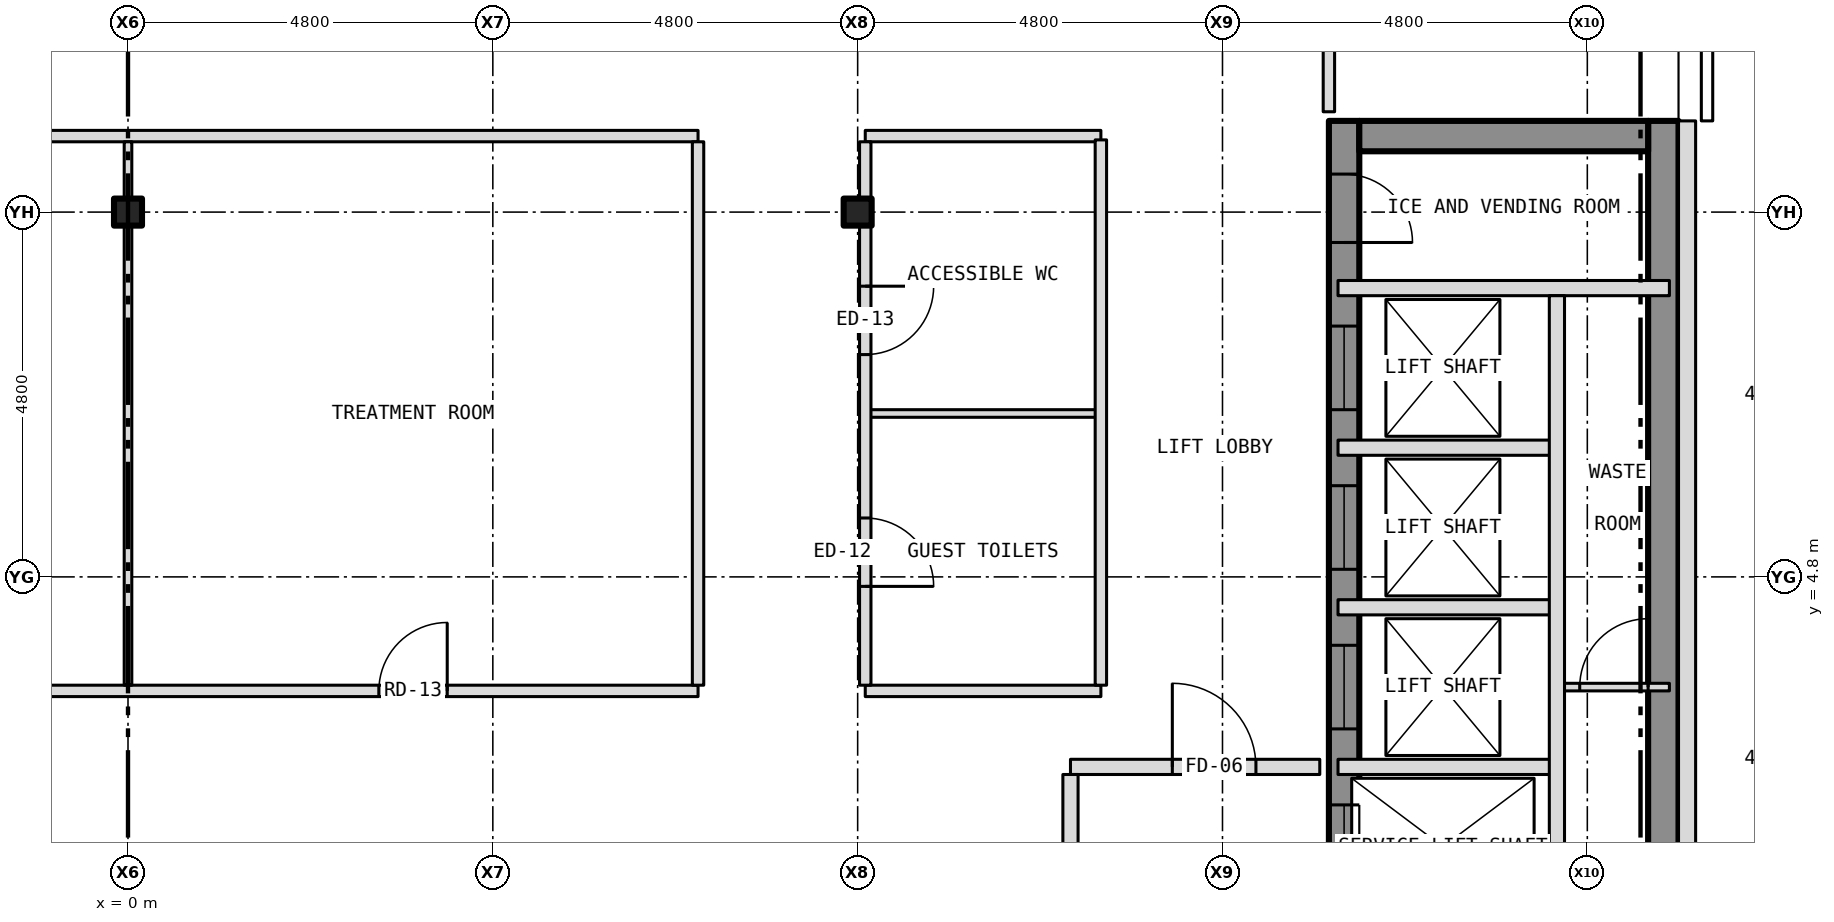
"""IFC4 building model, lengths in metres.
Left out: names, types, materials, properties, quantities, classifications, styles, units other than length and angle.
Written with IfcOpenShell. Run it as: python <this file> out.ifc"""

import sys

from ifc_helpers import new_model, si_unit, direction, frame, frame_2d, origin, origin_2d, place, context, subcontext, project, spatial, rectangle, i_section, extrude, element, fill, save


model = new_model("IFC4")
c1 = context("Model", 3, precision=1e-05, world=origin(), true_north=direction((0.0, 1.0)))
c2 = subcontext(c1, "Body", "Model", "MODEL_VIEW")
j1 = project(units=[si_unit("LENGTHUNIT", "METRE"), si_unit("PLANEANGLEUNIT", "RADIAN")], contexts=[c1])
p1 = place(None, origin())
s1 = spatial("IfcSite", under=j1, at=p1, CompositionType="ELEMENT")
p2 = place(p1, origin())
s2 = spatial("IfcBuilding", under=s1, at=p2, CompositionType="ELEMENT")
p3 = place(p2, frame((0.0, 0.0, 244.5)))
s3 = spatial("IfcBuildingStorey", under=s2, at=p3, CompositionType="ELEMENT", Elevation=244.5)
for number, where, z_axis, x_axis in (
    (1, (0.0, 9.6, -0.15), (0.0, 0.0, 1.0), (1.0, 0.0, 0.0)),
    (2, (9.6, 9.6, -0.15), (0.0, 0.0, 1.0), (1.0, 0.0, 0.0)),
):
    element("IfcColumn", number, at=place(p3, frame(where, z_axis=z_axis, x_axis=x_axis)), inside=s3, PredefinedType="COLUMN", context=c2, shape_type="SweptSolid", body=[
        extrude(i_section(OverallWidth=0.368, OverallDepth=0.356, WebThickness=0.011, FlangeThickness=0.018, at=origin_2d()), origin(), (0.0, 0.0, 1.0), 3.5),
    ])
p4 = place(p3, frame((16.0, -10.8, 0.0), z_axis=(0.0, 0.0, 1.0), x_axis=(0.0, 1.0, 0.0)))
e3 = element("IfcWall", 3, at=p4, inside=s3, PredefinedType="SHEAR", context=c2, shape_type="SweptSolid", body=[
    extrude(rectangle(XDim=21.6, YDim=0.4, at=frame_2d((10.8, 0.0))), origin(), (0.0, 0.0, 1.0), 3.25),
])
p5 = place(p4, frame((9.4, 0.0, 0.0)))
e4 = element("IfcOpeningElement", 4, at=p5, cuts=e3, PredefinedType="OPENING", context=c2, shape_type="SweptSolid", body=[
    extrude(rectangle(XDim=1.1, YDim=2.1, at=frame_2d((0.55, 1.05))), frame((0.0, 0.212, 0.0), z_axis=(0.0, -1.0, 0.0), x_axis=(1.0, 0.0, 0.0)), (0.0, 0.0, 1.0), 0.424),
])
p6 = place(p4, frame((11.5, 0.0, 0.0)))
e5 = element("IfcOpeningElement", 5, at=p6, cuts=e3, PredefinedType="OPENING", context=c2, shape_type="SweptSolid", body=[
    extrude(rectangle(XDim=1.1, YDim=2.1, at=frame_2d((0.55, 1.05))), frame((0.0, 0.212, 0.0), z_axis=(0.0, -1.0, 0.0), x_axis=(1.0, 0.0, 0.0)), (0.0, 0.0, 1.0), 0.424),
])
p7 = place(p4, frame((13.6, 0.0, 0.0)))
e6 = element("IfcOpeningElement", 6, at=p7, cuts=e3, PredefinedType="OPENING", context=c2, shape_type="SweptSolid", body=[
    extrude(rectangle(XDim=1.1, YDim=2.1, at=frame_2d((0.55, 1.05))), frame((0.0, 0.212, 0.0), z_axis=(0.0, -1.0, 0.0), x_axis=(1.0, 0.0, 0.0)), (0.0, 0.0, 1.0), 0.424),
])
p8 = place(p4, frame((15.7, 0.0, 0.0)))
e7 = element("IfcOpeningElement", 7, at=p8, cuts=e3, PredefinedType="OPENING", context=c2, shape_type="SweptSolid", body=[
    extrude(rectangle(XDim=1.1, YDim=2.1, at=frame_2d((0.55, 1.05))), frame((0.0, 0.212, 0.0), z_axis=(0.0, -1.0, 0.0), x_axis=(1.0, 0.0, 0.0)), (0.0, 0.0, 1.0), 0.424),
])
p9 = place(p4, frame((17.8, 0.0, 0.0)))
e8 = element("IfcOpeningElement", 8, at=p9, cuts=e3, PredefinedType="OPENING", context=c2, shape_type="SweptSolid", body=[
    extrude(rectangle(XDim=1.1, YDim=2.1, at=frame_2d((0.55, 1.05))), frame((0.0, 0.212, 0.0), z_axis=(0.0, -1.0, 0.0), x_axis=(1.0, 0.0, 0.0)), (0.0, 0.0, 1.0), 0.424),
])
p10 = place(p4, frame((5.642, 0.0, 0.0)))
e9 = element("IfcOpeningElement", 9, at=p10, cuts=e3, PredefinedType="OPENING", context=c2, shape_type="SweptSolid", body=[
    extrude(rectangle(XDim=1.1, YDim=2.1, at=frame_2d((0.55, 1.05))), frame((0.0, 0.212, 0.0), z_axis=(0.0, -1.0, 0.0), x_axis=(1.0, 0.0, 0.0)), (0.0, 0.0, 1.0), 0.424),
])
p11 = place(p4, frame((7.5, 0.0, 0.0)))
e10 = element("IfcOpeningElement", 10, at=p11, cuts=e3, PredefinedType="OPENING", context=c2, shape_type="SweptSolid", body=[
    extrude(rectangle(XDim=1.1, YDim=2.1, at=frame_2d((0.55, 1.05))), frame((0.0, 0.212, 0.0), z_axis=(0.0, -1.0, 0.0), x_axis=(1.0, 0.0, 0.0)), (0.0, 0.0, 1.0), 0.424),
])
p12 = place(p4, frame((20.0, 0.0, 0.0)))
e11 = element("IfcOpeningElement", 11, at=p12, cuts=e3, PredefinedType="OPENING", context=c2, shape_type="SweptSolid", body=[
    extrude(rectangle(XDim=0.9, YDim=2.1, at=frame_2d((0.45, 1.05))), frame((0.0, 0.212, 0.0), z_axis=(0.0, -1.0, 0.0), x_axis=(1.0, 0.0, 0.0)), (0.0, 0.0, 1.0), 0.424),
])
p13 = place(p3, frame((20.2, -10.8, 0.0), z_axis=(0.0, 0.0, 1.0), x_axis=(0.0, 1.0, 0.0)))
e12 = element("IfcWall", 12, at=p13, inside=s3, PredefinedType="SHEAR", context=c2, shape_type="SweptSolid", body=[
    extrude(rectangle(XDim=21.6, YDim=0.4, at=frame_2d((10.8, 0.0))), origin(), (0.0, 0.0, 1.0), 3.25),
])
p14 = place(p3, frame((16.2, 10.6, 0.0), z_axis=(0.0, 0.0, 1.0), x_axis=(1.0, 0.0, 0.0)))
e13 = element("IfcWall", 13, at=p14, inside=s3, PredefinedType="SHEAR", context=c2, shape_type="SweptSolid", body=[
    extrude(rectangle(XDim=3.8, YDim=0.4, at=frame_2d((1.9, 0.0))), origin(), (0.0, 0.0, 1.0), 3.25),
])
p15 = place(p3, frame((20.512, -10.8, 0.0), z_axis=(0.0, 0.0, 1.0), x_axis=(0.0, 1.0, 0.0)))
e14 = element("IfcWall", 14, at=p15, inside=s3, PredefinedType="SOLIDWALL", context=c2, shape_type="SweptSolid", body=[
    extrude(rectangle(XDim=21.6, YDim=0.225, at=frame_2d((10.8, 0.0))), origin(), (0.0, 0.0, 1.0), 3.5),
])
p16 = place(p15, frame((2.95, 0.0, 1.0)))
e15 = element("IfcOpeningElement", 15, at=p16, cuts=e14, PredefinedType="OPENING", context=c2, shape_type="SweptSolid", body=[
    extrude(rectangle(XDim=0.6, YDim=1.5, at=frame_2d((0.3, 0.75))), frame((0.0, 0.125, 0.0), z_axis=(0.0, -1.0, 0.0), x_axis=(1.0, 0.0, 0.0)), (0.0, 0.0, 1.0), 0.249),
])
p17 = place(p3, frame((12.4, 2.3, 0.0), z_axis=(0.0, 0.0, 1.0), x_axis=(1.0, 0.0, 0.0)))
e16 = element("IfcWall", 16, at=p17, inside=s3, PredefinedType="PARTITIONING", context=c2, shape_type="SweptSolid", body=[
    extrude(rectangle(XDim=3.28, YDim=0.2, at=frame_2d((1.64, 0.0))), origin(), (0.0, 0.0, 1.0), 3.35),
])
p18 = place(p17, frame((1.34, 0.0, 0.0)))
e17 = element("IfcOpeningElement", 17, at=p18, cuts=e16, PredefinedType="OPENING", context=c2, shape_type="SweptSolid", body=[
    extrude(rectangle(XDim=1.1, YDim=2.1, at=frame_2d((0.55, 1.05))), frame((0.0, 0.112, 0.0), z_axis=(0.0, -1.0, 0.0), x_axis=(1.0, 0.0, 0.0)), (0.0, 0.0, 1.0), 0.224),
])
p19 = place(p3, frame((15.92, 2.3, 0.0), z_axis=(0.0, 0.0, 1.0), x_axis=(1.0, 0.0, 0.0)))
e18 = element("IfcWall", 18, at=p19, inside=s3, PredefinedType="PARTITIONING", context=c2, shape_type="SweptSolid", body=[
    extrude(rectangle(XDim=2.88, YDim=0.2, at=frame_2d((1.44, 0.0))), origin(), (0.0, 0.0, 1.0), 3.25),
])
p20 = place(p3, frame((-12.8, 3.3, 0.0), z_axis=(0.0, 0.0, 1.0), x_axis=(1.0, 0.0, 0.0)))
e19 = element("IfcWall", 19, at=p20, inside=s3, PredefinedType="PARTITIONING", context=c2, shape_type="SweptSolid", body=[
    extrude(rectangle(XDim=20.3, YDim=0.15, at=frame_2d((10.15, 0.0))), origin(), (0.0, 0.0, 1.0), 3.35),
])
p21 = place(p20, frame((16.1, 0.0, 0.0)))
e20 = element("IfcOpeningElement", 20, at=p21, cuts=e19, PredefinedType="OPENING", context=c2, shape_type="SweptSolid", body=[
    extrude(rectangle(XDim=0.9, YDim=2.1, at=frame_2d((0.45, 1.05))), frame((0.0, 0.087, 0.0), z_axis=(0.0, -1.0, 0.0), x_axis=(1.0, 0.0, 0.0)), (0.0, 0.0, 1.0), 0.174),
])
p22 = place(p3, frame((9.7, 3.3, 0.0), z_axis=(0.0, 0.0, 1.0), x_axis=(1.0, 0.0, 0.0)))
e21 = element("IfcWall", 21, at=p22, inside=s3, PredefinedType="PARTITIONING", context=c2, shape_type="SweptSolid", body=[
    extrude(rectangle(XDim=3.1, YDim=0.15, at=frame_2d((1.55, 0.0))), origin(), (0.0, 0.0, 1.0), 3.35),
])
p23 = place(p3, frame((18.8, 3.35, 0.0), z_axis=(0.0, 0.0, 1.0), x_axis=(1.0, 0.0, 0.0)))
e22 = element("IfcWall", 22, at=p23, inside=s3, PredefinedType="PARTITIONING", context=c2, shape_type="SweptSolid", body=[
    extrude(rectangle(XDim=1.48, YDim=0.1, at=frame_2d((0.74, 0.0))), origin(), (0.0, 0.0, 1.0), 3.25),
])
p24 = place(p23, frame((0.3, 0.0, 0.0)))
e23 = element("IfcOpeningElement", 23, at=p24, cuts=e22, PredefinedType="OPENING", context=c2, shape_type="SweptSolid", body=[
    extrude(rectangle(XDim=0.9, YDim=2.1, at=frame_2d((0.45, 1.05))), frame((0.0, 0.062, 0.0), z_axis=(0.0, -1.0, 0.0), x_axis=(1.0, 0.0, 0.0)), (0.0, 0.0, 1.0), 0.124),
])
for number, where, z_axis, x_axis in (
    (24, (15.92, 4.4, 0.0), (0.0, 0.0, 1.0), (1.0, 0.0, 0.0)),
    (25, (15.92, 6.5, 0.0), (0.0, 0.0, 1.0), (1.0, 0.0, 0.0)),
):
    element("IfcWall", number, at=place(p3, frame(where, z_axis=z_axis, x_axis=x_axis)), inside=s3, PredefinedType="PARTITIONING", context=c2, shape_type="SweptSolid", body=[
        extrude(rectangle(XDim=2.88, YDim=0.2, at=frame_2d((1.44, 0.0))), origin(), (0.0, 0.0, 1.0), 3.25),
    ])
p25 = place(p3, frame((9.7, 6.95, 0.0), z_axis=(0.0, 0.0, 1.0), x_axis=(1.0, 0.0, 0.0)))
e26 = element("IfcWall", 26, at=p25, inside=s3, PredefinedType="PARTITIONING", context=c2, shape_type="SweptSolid", body=[
    extrude(rectangle(XDim=3.1, YDim=0.1, at=frame_2d((1.55, 0.0))), origin(), (0.0, 0.0, 1.0), 3.35),
])
p26 = place(p3, frame((15.92, 8.6, 0.0), z_axis=(0.0, 0.0, 1.0), x_axis=(1.0, 0.0, 0.0)))
e27 = element("IfcWall", 27, at=p26, inside=s3, PredefinedType="PARTITIONING", context=c2, shape_type="SweptSolid", body=[
    extrude(rectangle(XDim=4.36, YDim=0.2, at=frame_2d((2.18, 0.0))), origin(), (0.0, 0.0, 1.0), 3.25),
])
p27 = place(p3, frame((-12.8, 10.6, 0.0), z_axis=(0.0, 0.0, 1.0), x_axis=(1.0, 0.0, 0.0)))
e28 = element("IfcWall", 28, at=p27, inside=s3, PredefinedType="PARTITIONING", context=c2, shape_type="SweptSolid", body=[
    extrude(rectangle(XDim=20.3, YDim=0.15, at=frame_2d((10.15, 0.0))), origin(), (0.0, 0.0, 1.0), 3.35),
])
p28 = place(p27, frame((5.95, 0.0, 0.0)))
e29 = element("IfcOpeningElement", 29, at=p28, cuts=e28, PredefinedType="OPENING", context=c2, shape_type="SweptSolid", body=[
    extrude(rectangle(XDim=0.9, YDim=2.1, at=frame_2d((0.45, 1.05))), frame((0.0, 0.087, 0.0), z_axis=(0.0, -1.0, 0.0), x_axis=(1.0, 0.0, 0.0)), (0.0, 0.0, 1.0), 0.174),
])
p29 = place(p3, frame((9.7, 10.6, 0.0), z_axis=(0.0, 0.0, 1.0), x_axis=(1.0, 0.0, 0.0)))
e30 = element("IfcWall", 30, at=p29, inside=s3, PredefinedType="PARTITIONING", context=c2, shape_type="SweptSolid", body=[
    extrude(rectangle(XDim=3.1, YDim=0.15, at=frame_2d((1.55, 0.0))), origin(), (0.0, 0.0, 1.0), 3.35),
])
p30 = place(p3, frame((0.0, 3.375, 0.0), z_axis=(0.0, 0.0, 1.0), x_axis=(0.0, 1.0, 0.0)))
e31 = element("IfcWall", 31, at=p30, inside=s3, PredefinedType="PARTITIONING", context=c2, shape_type="SweptSolid", body=[
    extrude(rectangle(XDim=6.041, YDim=0.1, at=frame_2d((3.021, 0.0))), origin(), (0.0, 0.0, 1.0), 2.728),
])
p31 = place(p3, frame((0.0, 9.416, 0.0), z_axis=(0.0, 0.0, 1.0), x_axis=(0.0, 1.0, 0.0)))
e32 = element("IfcWall", 32, at=p31, inside=s3, PredefinedType="PARTITIONING", context=c2, shape_type="SweptSolid", body=[
    extrude(rectangle(XDim=0.368, YDim=0.1, at=frame_2d((0.184, 0.0))), origin(), (0.0, 0.0, 1.0), 3.35),
])
p32 = place(p3, frame((0.0, 9.784, 0.0), z_axis=(0.0, 0.0, 1.0), x_axis=(0.0, 1.0, 0.0)))
e33 = element("IfcWall", 33, at=p32, inside=s3, PredefinedType="PARTITIONING", context=c2, shape_type="SweptSolid", body=[
    extrude(rectangle(XDim=0.741, YDim=0.1, at=frame_2d((0.371, 0.0))), origin(), (0.0, 0.0, 1.0), 2.728),
])
p33 = place(p3, frame((7.5, 3.375, 0.0), z_axis=(0.0, 0.0, 1.0), x_axis=(0.0, 1.0, 0.0)))
e34 = element("IfcWall", 34, at=p33, inside=s3, PredefinedType="PARTITIONING", context=c2, shape_type="SweptSolid", body=[
    extrude(rectangle(XDim=7.15, YDim=0.15, at=frame_2d((3.575, 0.0))), origin(), (0.0, 0.0, 1.0), 3.35),
])
p34 = place(p3, frame((9.7, 3.375, 0.0), z_axis=(0.0, 0.0, 1.0), x_axis=(0.0, 1.0, 0.0)))
e35 = element("IfcWall", 35, at=p34, inside=s3, PredefinedType="PARTITIONING", context=c2, shape_type="SweptSolid", body=[
    extrude(rectangle(XDim=6.041, YDim=0.15, at=frame_2d((3.021, 0.0))), origin(), (0.0, 0.0, 1.0), 2.728),
])
p35 = place(p34, frame((1.3, 0.0, 0.0)))
e36 = element("IfcOpeningElement", 36, at=p35, cuts=e35, PredefinedType="OPENING", context=c2, shape_type="SweptSolid", body=[
    extrude(rectangle(XDim=0.9, YDim=2.1, at=frame_2d((0.45, 1.05))), frame((0.0, 0.087, 0.0), z_axis=(0.0, -1.0, 0.0), x_axis=(1.0, 0.0, 0.0)), (0.0, 0.0, 1.0), 0.174),
])
p36 = place(p34, frame((4.35, 0.0, 0.0)))
e37 = element("IfcOpeningElement", 37, at=p36, cuts=e35, PredefinedType="OPENING", context=c2, shape_type="SweptSolid", body=[
    extrude(rectangle(XDim=0.9, YDim=2.1, at=frame_2d((0.45, 1.05))), frame((0.0, 0.087, 0.0), z_axis=(0.0, -1.0, 0.0), x_axis=(1.0, 0.0, 0.0)), (0.0, 0.0, 1.0), 0.174),
])
p37 = place(p3, frame((9.7, 9.416, 0.0), z_axis=(0.0, 0.0, 1.0), x_axis=(0.0, 1.0, 0.0)))
e38 = element("IfcWall", 38, at=p37, inside=s3, PredefinedType="PARTITIONING", context=c2, shape_type="SweptSolid", body=[
    extrude(rectangle(XDim=0.368, YDim=0.15, at=frame_2d((0.184, 0.0))), origin(), (0.0, 0.0, 1.0), 3.35),
])
p38 = place(p3, frame((9.7, 9.784, 0.0), z_axis=(0.0, 0.0, 1.0), x_axis=(0.0, 1.0, 0.0)))
e39 = element("IfcWall", 39, at=p38, inside=s3, PredefinedType="PARTITIONING", context=c2, shape_type="SweptSolid", body=[
    extrude(rectangle(XDim=0.741, YDim=0.15, at=frame_2d((0.371, 0.0))), origin(), (0.0, 0.0, 1.0), 2.728),
])
p39 = place(p3, frame((12.4, -1.8, 0.0), z_axis=(0.0, 0.0, 1.0), x_axis=(0.0, 1.0, 0.0)))
e40 = element("IfcWall", 40, at=p39, inside=s3, PredefinedType="PARTITIONING", context=c2, shape_type="SweptSolid", body=[
    extrude(rectangle(XDim=4.0, YDim=0.2, at=frame_2d((2.0, 0.0))), origin(), (0.0, 0.0, 1.0), 3.35),
])
p40 = place(p3, frame((12.8, 3.375, 0.0), z_axis=(0.0, 0.0, 1.0), x_axis=(0.0, 1.0, 0.0)))
e41 = element("IfcWall", 41, at=p40, inside=s3, PredefinedType="PARTITIONING", context=c2, shape_type="SweptSolid", body=[
    extrude(rectangle(XDim=7.175, YDim=0.15, at=frame_2d((3.587, 0.0))), origin(), (0.0, 0.0, 1.0), 3.35),
])
p41 = place(p3, frame((15.8, 10.92, 0.0), z_axis=(0.0, 0.0, 1.0), x_axis=(0.0, 1.0, 0.0)))
e42 = element("IfcWall", 42, at=p41, inside=s3, PredefinedType="PARTITIONING", context=c2, shape_type="SweptSolid", body=[
    extrude(rectangle(XDim=1.805, YDim=0.15, at=frame_2d((0.903, 0.0))), origin(), (0.0, 0.0, 1.0), 3.35),
])
p42 = place(p3, frame((18.8, -1.8, 0.0), z_axis=(0.0, 0.0, 1.0), x_axis=(0.0, 1.0, 0.0)))
e43 = element("IfcWall", 43, at=p42, inside=s3, PredefinedType="PARTITIONING", context=c2, shape_type="SweptSolid", body=[
    extrude(rectangle(XDim=10.3, YDim=0.2, at=frame_2d((5.15, 0.0))), origin(), (0.0, 0.0, 1.0), 3.25),
])
p43 = place(p6, origin())
e44 = element("IfcDoor", 44, at=p43, inside=s3, OperationType="SLIDING_TO_LEFT", PredefinedType="DOOR", context=c2, shape_type="SweptSolid", body=[
    extrude(rectangle(XDim=1.1, YDim=2.1, at=frame_2d((0.55, 1.05))), frame((0.0, 0.025, 0.0), z_axis=(0.0, -1.0, 0.0), x_axis=(1.0, 0.0, 0.0)), (0.0, 0.0, 1.0), 0.05),
])
fill(e5, e44)
p44 = place(p7, origin())
e45 = element("IfcDoor", 45, at=p44, inside=s3, OperationType="SLIDING_TO_LEFT", PredefinedType="DOOR", context=c2, shape_type="SweptSolid", body=[
    extrude(rectangle(XDim=1.1, YDim=2.1, at=frame_2d((0.55, 1.05))), frame((0.0, 0.025, 0.0), z_axis=(0.0, -1.0, 0.0), x_axis=(1.0, 0.0, 0.0)), (0.0, 0.0, 1.0), 0.05),
])
fill(e6, e45)
p45 = place(p8, origin())
e46 = element("IfcDoor", 46, at=p45, inside=s3, OperationType="SLIDING_TO_LEFT", PredefinedType="DOOR", context=c2, shape_type="SweptSolid", body=[
    extrude(rectangle(XDim=1.1, YDim=2.1, at=frame_2d((0.55, 1.05))), frame((0.0, 0.025, 0.0), z_axis=(0.0, -1.0, 0.0), x_axis=(1.0, 0.0, 0.0)), (0.0, 0.0, 1.0), 0.05),
])
fill(e7, e46)
p46 = place(p9, origin())
e47 = element("IfcDoor", 47, at=p46, inside=s3, OperationType="SLIDING_TO_LEFT", PredefinedType="DOOR", context=c2, shape_type="SweptSolid", body=[
    extrude(rectangle(XDim=1.1, YDim=2.1, at=frame_2d((0.55, 1.05))), frame((0.0, 0.025, 0.0), z_axis=(0.0, -1.0, 0.0), x_axis=(1.0, 0.0, 0.0)), (0.0, 0.0, 1.0), 0.05),
])
fill(e8, e47)
p47 = place(p12, origin())
e48 = element("IfcDoor", 48, at=p47, inside=s3, OperationType="SINGLE_SWING_LEFT", PredefinedType="DOOR", context=c2, shape_type="SweptSolid", body=[
    extrude(rectangle(XDim=0.9, YDim=2.1, at=frame_2d((0.45, 1.05))), frame((0.0, 0.025, 0.0), z_axis=(0.0, -1.0, 0.0), x_axis=(1.0, 0.0, 0.0)), (0.0, 0.0, 1.0), 0.05),
])
fill(e11, e48)
p48 = place(p24, origin())
e49 = element("IfcDoor", 49, at=p48, inside=s3, OperationType="SINGLE_SWING_RIGHT", PredefinedType="DOOR", context=c2, shape_type="SweptSolid", body=[
    extrude(rectangle(XDim=0.9, YDim=2.1, at=frame_2d((0.45, 1.05))), frame((0.0, 0.025, 0.0), z_axis=(0.0, -1.0, 0.0), x_axis=(1.0, 0.0, 0.0)), (0.0, 0.0, 1.0), 0.05),
])
fill(e23, e49)
p49 = place(p18, origin())
e50 = element("IfcDoor", 50, at=p49, inside=s3, OperationType="SINGLE_SWING_LEFT", PredefinedType="DOOR", context=c2, shape_type="SweptSolid", body=[
    extrude(rectangle(XDim=1.1, YDim=2.1, at=frame_2d((0.55, 1.05))), frame((0.0, 0.025, 0.0), z_axis=(0.0, -1.0, 0.0), x_axis=(1.0, 0.0, 0.0)), (0.0, 0.0, 1.0), 0.05),
])
fill(e17, e50)
p50 = place(p35, origin())
e51 = element("IfcDoor", 51, at=p50, inside=s3, OperationType="SINGLE_SWING_LEFT", PredefinedType="DOOR", context=c2, shape_type="SweptSolid", body=[
    extrude(rectangle(XDim=0.9, YDim=2.1, at=frame_2d((0.45, 1.05))), frame((0.0, 0.025, 0.0), z_axis=(0.0, -1.0, 0.0), x_axis=(1.0, 0.0, 0.0)), (0.0, 0.0, 1.0), 0.05),
])
fill(e36, e51)
p51 = place(p36, origin())
e52 = element("IfcDoor", 52, at=p51, inside=s3, OperationType="SINGLE_SWING_RIGHT", PredefinedType="DOOR", context=c2, shape_type="SweptSolid", body=[
    extrude(rectangle(XDim=0.9, YDim=2.1, at=frame_2d((0.45, 1.05))), frame((0.0, 0.025, 0.0), z_axis=(0.0, -1.0, 0.0), x_axis=(1.0, 0.0, 0.0)), (0.0, 0.0, 1.0), 0.05),
])
fill(e37, e52)
p52 = place(p21, origin())
e53 = element("IfcDoor", 53, at=p52, inside=s3, OperationType="SINGLE_SWING_RIGHT", PredefinedType="DOOR", context=c2, shape_type="SweptSolid", body=[
    extrude(rectangle(XDim=0.9, YDim=2.1, at=frame_2d((0.45, 1.05))), frame((0.0, 0.025, 0.0), z_axis=(0.0, -1.0, 0.0), x_axis=(1.0, 0.0, 0.0)), (0.0, 0.0, 1.0), 0.05),
])
fill(e20, e53)
save(model, sys.argv[1])
